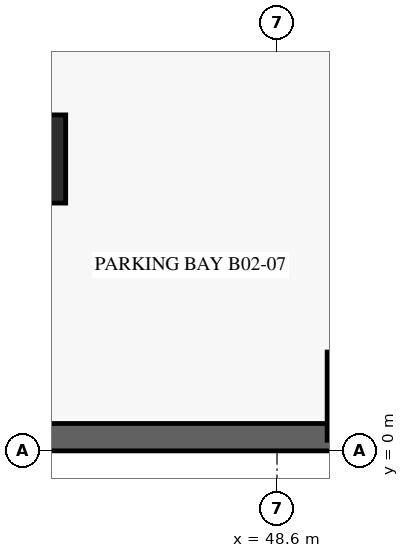
"""IFC4 building model, lengths in metres.
Left out: names, types, materials, properties, quantities, classifications, styles, units other than length and angle.
Written with IfcOpenShell. Run it as: python <this file> out.ifc"""

import sys

from ifc_helpers import new_model, si_unit, direction, frame, frame_2d, origin, origin_2d, place, context, subcontext, project, spatial, rectangle, extrude, source, transform, mapped, element, save


model = new_model("IFC4")
c1 = context("Model", 3, precision=1e-05, world=origin(), true_north=direction((0.0, 1.0)))
c2 = subcontext(c1, "Body", "Model", "MODEL_VIEW")
j1 = project(units=[si_unit("LENGTHUNIT", "METRE"), si_unit("PLANEANGLEUNIT", "RADIAN")], contexts=[c1])
p1 = place(None, origin())
s1 = spatial("IfcSite", under=j1, at=p1, CompositionType="ELEMENT")
p2 = place(p1, origin())
s2 = spatial("IfcBuilding", under=s1, at=p2, CompositionType="ELEMENT")
p3 = place(p2, frame((0.0, 0.0, -7.2)))
s3 = spatial("IfcBuildingStorey", under=s2, at=p3, CompositionType="ELEMENT", Elevation=-7.2)
p4 = place(p3, frame((0.225, 0.225, -0.36), z_axis=(0.0, 0.0, 1.0), x_axis=(1.0, 0.0, 0.0)))
e1 = element("IfcWall", 1, at=p4, inside=s3, PredefinedType="USERDEFINED", context=c2, shape_type="SweptSolid", body=[
    extrude(rectangle(XDim=64.35, YDim=0.45, at=frame_2d((32.175, 0.0))), origin(), (0.0, 0.0, 1.0), 3.598),
])
m1 = source(origin(), c2, "Body", "SweptSolid", [
    extrude(rectangle(XDim=1.45, YDim=1.45, at=origin_2d()), origin(), (0.0, 0.0, 1.0), 3.6),
])
for number, where, z_axis, x_axis in (
    (2, (44.4, 4.8, -0.36), (0.0, 0.0, 1.0), (1.0, 0.0, 0.0)),
    (3, (50.15, 0.9, -0.36), (0.0, 0.0, 1.0), (1.0, 0.0, 0.0)),
):
    element("IfcColumn", number, at=place(p3, frame(where, z_axis=z_axis, x_axis=x_axis)), inside=s3, PredefinedType="COLUMN", context=c2, shape_type="MappedRepresentation", body=[
        mapped(m1, transform((0.0, 0.0, 0.0), scale=1.0)),
    ])
save(model, sys.argv[1])
